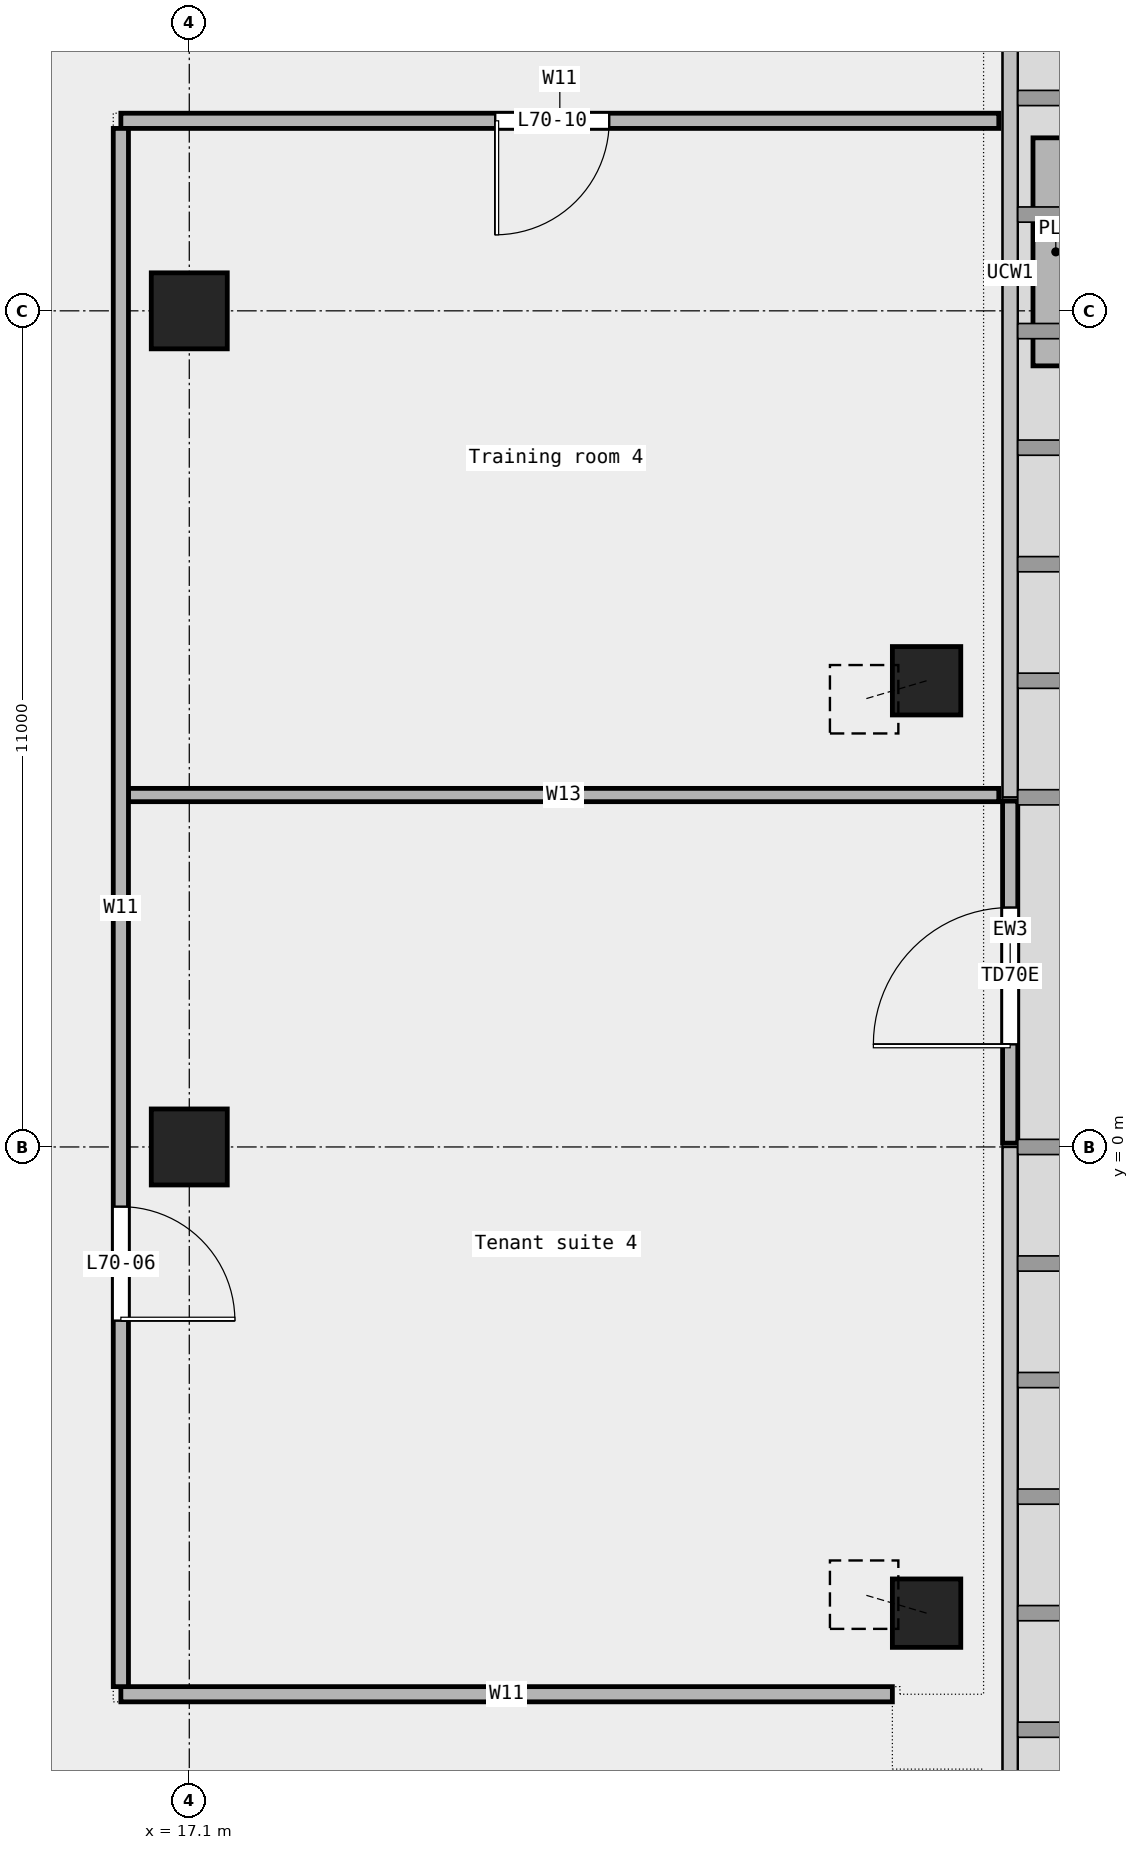
"""IFC4 building model, lengths in metres.
Left out: names, types, materials, properties, quantities, classifications, styles, units other than length and angle.
Written with IfcOpenShell. Run it as: python <this file> out.ifc"""

import sys

from ifc_helpers import new_model, si_unit, direction, frame, frame_2d, origin, origin_2d, place, context, subcontext, project, spatial, rectangle, extrude, element, fill, save


model = new_model("IFC4")
c1 = context("Model", 3, precision=1e-05, world=origin(), true_north=direction((0.0, 1.0)))
c2 = subcontext(c1, "Body", "Model", "MODEL_VIEW")
j1 = project(units=[si_unit("LENGTHUNIT", "METRE"), si_unit("PLANEANGLEUNIT", "RADIAN")], contexts=[c1])
p1 = place(None, origin())
s1 = spatial("IfcSite", under=j1, at=p1, CompositionType="ELEMENT")
p2 = place(p1, origin())
s2 = spatial("IfcBuilding", under=s1, at=p2, CompositionType="ELEMENT")
p3 = place(p2, frame((0.0, 0.0, 321.4)))
s3 = spatial("IfcBuildingStorey", under=s2, at=p3, CompositionType="ELEMENT", Elevation=321.4)
for number, where, z_axis, x_axis in (
    (1, (26.8, -6.133, 0.0), (-0.219, 0.065, 0.974), (-0.284, -0.959, 0.0)),
    (2, (26.8, 6.133, 0.0), (-0.219, -0.065, 0.974), (0.284, -0.959, 0.0)),
):
    element("IfcColumn", number, at=place(p3, frame(where, z_axis=z_axis, x_axis=x_axis)), inside=s3, PredefinedType="COLUMN", context=c2, shape_type="SweptSolid", body=[
        extrude(rectangle(XDim=0.9, YDim=0.9, at=origin_2d()), origin(), (0.0, 0.0, 1.0), 3.749),
    ])
for number, where, z_axis, x_axis in (
    (3, (17.1, 0.0, 0.0), (0.0, 0.0, 1.0), (1.0, 0.0, 0.0)),
    (4, (17.1, 11.0, 0.0), (0.0, 0.0, 1.0), (1.0, 0.0, 0.0)),
):
    element("IfcColumn", number, at=place(p3, frame(where, z_axis=z_axis, x_axis=x_axis)), inside=s3, PredefinedType="COLUMN", context=c2, shape_type="SweptSolid", body=[
        extrude(rectangle(XDim=1.0, YDim=1.0, at=origin_2d()), origin(), (0.0, 0.0, 1.0), 3.65),
    ])
p4 = place(p3, frame((27.9, 0.05, 0.0), z_axis=(0.0, 0.0, 1.0), x_axis=(0.0, 1.0, 0.0)))
e5 = element("IfcWall", 5, at=p4, inside=s3, PredefinedType="STANDARD", context=c2, shape_type="SweptSolid", body=[
    extrude(rectangle(XDim=4.5, YDim=0.2, at=frame_2d((2.25, 0.0))), origin(), (0.0, 0.0, 1.0), 3.65),
])
p5 = place(p4, frame((1.3, 0.0, 0.0)))
e6 = element("IfcOpeningElement", 6, at=p5, cuts=e5, PredefinedType="OPENING", context=c2, shape_type="SweptSolid", body=[
    extrude(rectangle(XDim=1.8, YDim=2.4, at=frame_2d((0.9, 1.2))), frame((0.0, 0.112, 0.0), z_axis=(0.0, -1.0, 0.0), x_axis=(1.0, 0.0, 0.0)), (0.0, 0.0, 1.0), 0.224),
])
p6 = place(p3, frame((28.5, 10.276, 0.0), z_axis=(0.0, 0.0, 1.0), x_axis=(0.0, 1.0, 0.0)))
e7 = element("IfcWall", 7, at=p6, inside=s3, PredefinedType="STANDARD", context=c2, shape_type="SweptSolid", body=[
    extrude(rectangle(XDim=3.0, YDim=0.6, at=frame_2d((1.5, 0.0))), origin(), (0.0, 0.0, 1.0), 0.7),
])
p7 = place(p3, frame((16.2, -7.2, 0.0), z_axis=(0.0, 0.0, 1.0), x_axis=(1.0, 0.0, 0.0)))
e8 = element("IfcWall", 8, at=p7, inside=s3, PredefinedType="PARTITIONING", context=c2, shape_type="SweptSolid", body=[
    extrude(rectangle(XDim=10.15, YDim=0.2, at=frame_2d((5.075, 0.0))), origin(), (0.0, 0.0, 1.0), 3.65),
])
p8 = place(p3, frame((16.3, 4.63, 0.0), z_axis=(0.0, 0.0, 1.0), x_axis=(1.0, 0.0, 0.0)))
e9 = element("IfcWall", 9, at=p8, inside=s3, PredefinedType="PARTITIONING", context=c2, shape_type="SweptSolid", body=[
    extrude(rectangle(XDim=11.45, YDim=0.175, at=frame_2d((5.725, 0.0))), origin(), (0.0, 0.0, 1.0), 3.65),
])
p9 = place(p3, frame((16.2, 13.5, 0.0), z_axis=(0.0, 0.0, 1.0), x_axis=(1.0, 0.0, 0.0)))
e10 = element("IfcWall", 10, at=p9, inside=s3, PredefinedType="PARTITIONING", context=c2, shape_type="SweptSolid", body=[
    extrude(rectangle(XDim=11.55, YDim=0.2, at=frame_2d((5.775, 0.0))), origin(), (0.0, 0.0, 1.0), 3.65),
])
p10 = place(p9, frame((4.925, 0.0, 0.0)))
e11 = element("IfcOpeningElement", 11, at=p10, cuts=e10, PredefinedType="OPENING", context=c2, shape_type="SweptSolid", body=[
    extrude(rectangle(XDim=1.5, YDim=2.1, at=frame_2d((0.75, 1.05))), frame((0.0, 0.112, 0.0), z_axis=(0.0, -1.0, 0.0), x_axis=(1.0, 0.0, 0.0)), (0.0, 0.0, 1.0), 0.224),
])
p11 = place(p3, frame((16.2, -7.1, 0.0), z_axis=(0.0, 0.0, 1.0), x_axis=(0.0, 1.0, 0.0)))
e12 = element("IfcWall", 12, at=p11, inside=s3, PredefinedType="PARTITIONING", context=c2, shape_type="SweptSolid", body=[
    extrude(rectangle(XDim=20.5, YDim=0.2, at=frame_2d((10.25, 0.0))), origin(), (0.0, 0.0, 1.0), 3.65),
])
p12 = place(p11, frame((4.815, 0.0, 0.0)))
e13 = element("IfcOpeningElement", 13, at=p12, cuts=e12, PredefinedType="OPENING", context=c2, shape_type="SweptSolid", body=[
    extrude(rectangle(XDim=1.5, YDim=2.1, at=frame_2d((0.75, 1.05))), frame((0.0, 0.112, 0.0), z_axis=(0.0, -1.0, 0.0), x_axis=(1.0, 0.0, 0.0)), (0.0, 0.0, 1.0), 0.224),
])
p13 = place(p5, origin())
e14 = element("IfcDoor", 14, at=p13, inside=s3, OperationType="DOUBLE_DOOR_SINGLE_SWING", PredefinedType="DOOR", context=c2, shape_type="SweptSolid", body=[
    extrude(rectangle(XDim=1.8, YDim=2.4, at=frame_2d((0.9, 1.2))), frame((0.0, 0.025, 0.0), z_axis=(0.0, -1.0, 0.0), x_axis=(1.0, 0.0, 0.0)), (0.0, 0.0, 1.0), 0.05),
])
fill(e6, e14)
p14 = place(p12, origin())
e15 = element("IfcDoor", 15, at=p14, inside=s3, OperationType="DOUBLE_DOOR_SINGLE_SWING", PredefinedType="DOOR", context=c2, shape_type="SweptSolid", body=[
    extrude(rectangle(XDim=1.5, YDim=2.1, at=frame_2d((0.75, 1.05))), frame((0.0, 0.025, 0.0), z_axis=(0.0, -1.0, 0.0), x_axis=(1.0, 0.0, 0.0)), (0.0, 0.0, 1.0), 0.05),
])
fill(e13, e15)
p15 = place(p10, origin())
e16 = element("IfcDoor", 16, at=p15, inside=s3, OperationType="DOUBLE_DOOR_SINGLE_SWING", PredefinedType="DOOR", context=c2, shape_type="SweptSolid", body=[
    extrude(rectangle(XDim=1.5, YDim=2.1, at=frame_2d((0.75, 1.05))), frame((0.0, 0.025, 0.0), z_axis=(0.0, -1.0, 0.0), x_axis=(1.0, 0.0, 0.0)), (0.0, 0.0, 1.0), 0.05),
])
fill(e11, e16)
save(model, sys.argv[1])
